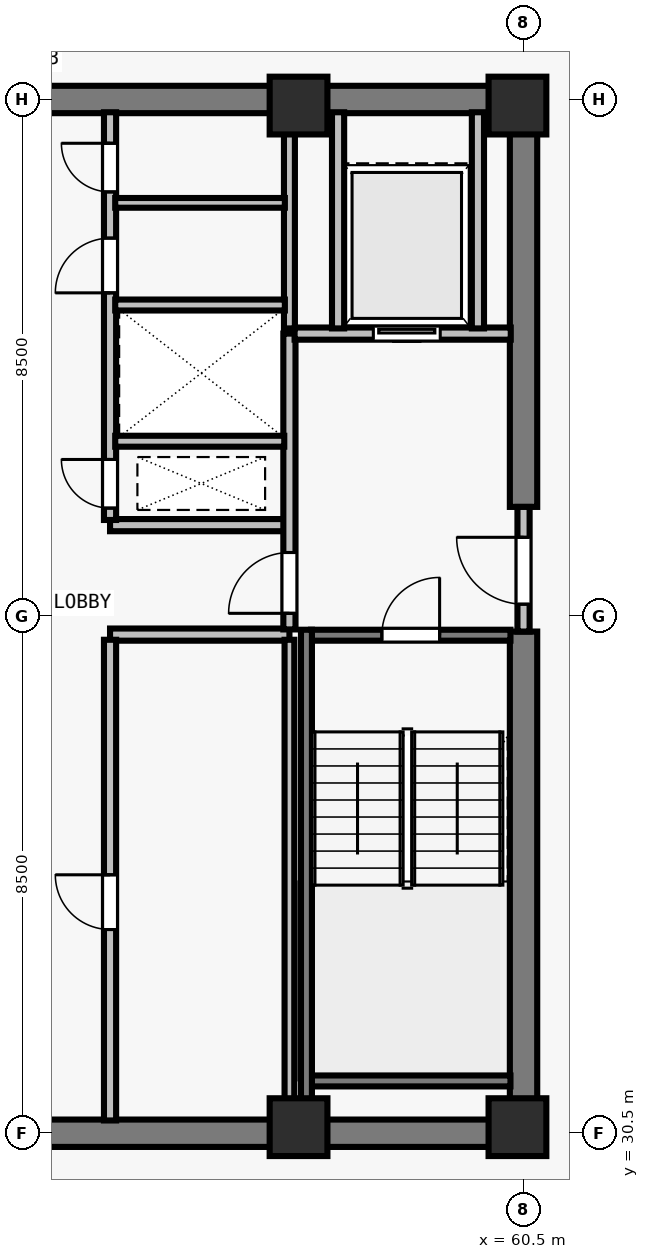
"""IFC4 building model, lengths in metres.
Left out: names, types, materials, properties, quantities, classifications, styles, units other than length and angle.
Written with IfcOpenShell. Run it as: python <this file> out.ifc"""

import sys

from ifc_helpers import new_model, si_unit, direction, frame, frame_2d, origin, origin_2d, place, context, subcontext, project, spatial, rectangle, extrude, element, fill, save


model = new_model("IFC4")
c1 = context("Model", 3, precision=1e-05, world=origin(), true_north=direction((0.0, 1.0)))
c2 = subcontext(c1, "Body", "Model", "MODEL_VIEW")
j1 = project(units=[si_unit("LENGTHUNIT", "METRE"), si_unit("PLANEANGLEUNIT", "RADIAN")], contexts=[c1])
p1 = place(None, origin())
s1 = spatial("IfcSite", under=j1, at=p1, CompositionType="ELEMENT")
p2 = place(p1, origin())
s2 = spatial("IfcBuilding", under=s1, at=p2, CompositionType="ELEMENT")
p3 = place(p2, frame((0.0, 0.0, 265.5)))
s3 = spatial("IfcBuildingStorey", under=s2, at=p3, CompositionType="ELEMENT", Elevation=265.5)
for number, where, z_axis, x_axis in (
    (1, (56.8, 30.6, 0.0), (0.0, 0.0, 1.0), (1.0, 0.0, 0.0)),
    (2, (60.4, 30.6, 0.0), (0.0, 0.0, 1.0), (1.0, 0.0, 0.0)),
    (3, (56.8, 47.4, 0.0), (0.0, 0.0, 1.0), (1.0, 0.0, 0.0)),
    (4, (60.4, 47.4, 0.0), (0.0, 0.0, 1.0), (1.0, 0.0, 0.0)),
):
    element("IfcColumn", number, at=place(p3, frame(where, z_axis=z_axis, x_axis=x_axis)), inside=s3, PredefinedType="COLUMN", context=c2, shape_type="SweptSolid", body=[
        extrude(rectangle(XDim=0.95, YDim=0.95, at=origin_2d()), origin(), (0.0, 0.0, 1.0), 3.5),
    ])
for number, where, z_axis, x_axis in (
    (5, (43.275, 30.5, 0.0), (0.0, 0.0, 1.0), (1.0, 0.0, 0.0)),
    (6, (43.275, 47.5, 0.0), (0.0, 0.0, 1.0), (1.0, 0.0, 0.0)),
):
    element("IfcWall", number, at=place(p3, frame(where, z_axis=z_axis, x_axis=x_axis)), inside=s3, PredefinedType="SHEAR", context=c2, shape_type="SweptSolid", body=[
        extrude(rectangle(XDim=17.45, YDim=0.45, at=frame_2d((8.725, 0.0))), origin(), (0.0, 0.0, 1.0), 3.29),
    ])
p4 = place(p3, frame((60.5, 30.715, 0.0), z_axis=(0.0, 0.0, 1.0), x_axis=(0.0, 1.0, 0.0)))
e7 = element("IfcWall", 7, at=p4, inside=s3, PredefinedType="SHEAR", context=c2, shape_type="SweptSolid", body=[
    extrude(rectangle(XDim=8.035, YDim=0.45, at=frame_2d((4.018, 0.0))), origin(), (0.0, 0.0, 1.0), 3.29),
])
p5 = place(p3, frame((60.5, 40.8, 0.0), z_axis=(0.0, 0.0, 1.0), x_axis=(0.0, 1.0, 0.0)))
e8 = element("IfcWall", 8, at=p5, inside=s3, PredefinedType="SHEAR", context=c2, shape_type="SweptSolid", body=[
    extrude(rectangle(XDim=6.485, YDim=0.45, at=frame_2d((3.242, 0.0))), origin(), (0.0, 0.0, 1.0), 3.29),
])
for number, where, z_axis, x_axis in (
    (9, (53.7, 38.7, 0.0), (0.0, 0.0, 1.0), (1.0, 0.0, 0.0)),
    (10, (53.7, 40.5, 0.0), (0.0, 0.0, 1.0), (1.0, 0.0, 0.0)),
):
    element("IfcWall", number, at=place(p3, frame(where, z_axis=z_axis, x_axis=x_axis)), inside=s3, PredefinedType="SOLIDWALL", context=c2, shape_type="SweptSolid", body=[
        extrude(rectangle(XDim=2.95, YDim=0.2, at=frame_2d((1.475, 0.0))), origin(), (0.0, 0.0, 1.0), 3.29),
    ])
p6 = place(p3, frame((53.7, 30.71, 0.0), z_axis=(0.0, 0.0, 1.0), x_axis=(0.0, 1.0, 0.0)))
e11 = element("IfcWall", 11, at=p6, inside=s3, PredefinedType="SOLIDWALL", context=c2, shape_type="SweptSolid", body=[
    extrude(rectangle(XDim=7.905, YDim=0.2, at=frame_2d((3.953, 0.0))), origin(), (0.0, 0.0, 1.0), 3.29),
])
p7 = place(p6, frame((3.14, 0.0, 0.0)))
e12 = element("IfcOpeningElement", 12, at=p7, cuts=e11, PredefinedType="OPENING", context=c2, shape_type="SweptSolid", body=[
    extrude(rectangle(XDim=0.9, YDim=2.12, at=frame_2d((0.45, 1.06))), frame((0.0, 0.11, 0.0), z_axis=(0.0, -1.0, 0.0), x_axis=(1.0, 0.0, 0.0)), (0.0, 0.0, 1.0), 0.22),
])
p8 = place(p3, frame((53.7, 40.585, 0.0), z_axis=(0.0, 0.0, 1.0), x_axis=(0.0, 1.0, 0.0)))
e13 = element("IfcWall", 13, at=p8, inside=s3, PredefinedType="SOLIDWALL", context=c2, shape_type="SweptSolid", body=[
    extrude(rectangle(XDim=6.705, YDim=0.2, at=frame_2d((3.353, 0.0))), origin(), (0.0, 0.0, 1.0), 3.29),
])
p9 = place(p8, frame((0.195, 0.0, 0.0)))
e14 = element("IfcOpeningElement", 14, at=p9, cuts=e13, PredefinedType="OPENING", context=c2, shape_type="SweptSolid", body=[
    extrude(rectangle(XDim=0.8, YDim=2.08, at=frame_2d((0.4, 1.04))), frame((0.0, 0.11, 0.0), z_axis=(0.0, -1.0, 0.0), x_axis=(1.0, 0.0, 0.0)), (0.0, 0.0, 1.0), 0.22),
])
p10 = place(p8, frame((3.735, 0.0, 0.0)))
e15 = element("IfcOpeningElement", 15, at=p10, cuts=e13, PredefinedType="OPENING", context=c2, shape_type="SweptSolid", body=[
    extrude(rectangle(XDim=0.9, YDim=2.12, at=frame_2d((0.45, 1.06))), frame((0.0, 0.11, 0.0), z_axis=(0.0, -1.0, 0.0), x_axis=(1.0, 0.0, 0.0)), (0.0, 0.0, 1.0), 0.22),
])
p11 = place(p8, frame((5.395, 0.0, 0.0)))
e16 = element("IfcOpeningElement", 16, at=p11, cuts=e13, PredefinedType="OPENING", context=c2, shape_type="SweptSolid", body=[
    extrude(rectangle(XDim=0.8, YDim=2.1, at=frame_2d((0.4, 1.05))), frame((0.0, 0.11, 0.0), z_axis=(0.0, -1.0, 0.0), x_axis=(1.0, 0.0, 0.0)), (0.0, 0.0, 1.0), 0.22),
])
p12 = place(p3, frame((60.5, 38.75, 0.0), z_axis=(0.0, 0.0, 1.0), x_axis=(0.0, 1.0, 0.0)))
e17 = element("IfcWall", 17, at=p12, inside=s3, PredefinedType="SOLIDWALL", context=c2, shape_type="SweptSolid", body=[
    extrude(rectangle(XDim=2.05, YDim=0.2, at=frame_2d((1.025, 0.0))), origin(), (0.0, 0.0, 1.0), 3.29),
])
p13 = place(p12, frame((0.45, 0.0, 0.0)))
e18 = element("IfcOpeningElement", 18, at=p13, cuts=e17, PredefinedType="OPENING", context=c2, shape_type="SweptSolid", body=[
    extrude(rectangle(XDim=1.1, YDim=2.15, at=frame_2d((0.55, 1.075))), frame((0.0, 0.11, 0.0), z_axis=(0.0, -1.0, 0.0), x_axis=(1.0, 0.0, 0.0)), (0.0, 0.0, 1.0), 0.22),
])
p14 = place(p3, frame((56.65, 38.785, 0.0), z_axis=(0.0, 0.0, 1.0), x_axis=(0.0, 1.0, 0.0)))
e19 = element("IfcWall", 19, at=p14, inside=s3, PredefinedType="SOLIDWALL", context=c2, shape_type="SweptSolid", body=[
    extrude(rectangle(XDim=4.865, YDim=0.2, at=frame_2d((2.433, 0.0))), origin(), (0.0, 0.0, 1.0), 3.29),
])
p15 = place(p14, frame((0.265, 0.0, 0.0)))
e20 = element("IfcOpeningElement", 20, at=p15, cuts=e19, PredefinedType="OPENING", context=c2, shape_type="SweptSolid", body=[
    extrude(rectangle(XDim=1.0, YDim=2.15, at=frame_2d((0.5, 1.075))), frame((0.0, 0.11, 0.0), z_axis=(0.0, -1.0, 0.0), x_axis=(1.0, 0.0, 0.0)), (0.0, 0.0, 1.0), 0.22),
])
p16 = place(p3, frame((56.735, 43.65, 0.0), z_axis=(0.0, 0.0, 1.0), x_axis=(1.0, 0.0, 0.0)))
e21 = element("IfcWall", 21, at=p16, inside=s3, PredefinedType="SOLIDWALL", context=c2, shape_type="SweptSolid", body=[
    extrude(rectangle(XDim=3.555, YDim=0.2, at=frame_2d((1.777, 0.0))), origin(), (0.0, 0.0, 1.0), 3.29),
])
p17 = place(p16, frame((1.295, 0.0, 0.0)))
e22 = element("IfcOpeningElement", 22, at=p17, cuts=e21, PredefinedType="OPENING", context=c2, shape_type="SweptSolid", body=[
    extrude(rectangle(XDim=1.1, YDim=2.2, at=frame_2d((0.55, 1.1))), frame((0.0, 0.11, 0.0), z_axis=(0.0, -1.0, 0.0), x_axis=(1.0, 0.0, 0.0)), (0.0, 0.0, 1.0), 0.22),
])
for number, where, z_axis, x_axis in (
    (23, (57.45, 43.735, 0.0), (0.0, 0.0, 1.0), (0.0, 1.0, 0.0)),
    (24, (59.75, 43.735, 0.0), (0.0, 0.0, 1.0), (0.0, 1.0, 0.0)),
):
    element("IfcWall", number, at=place(p3, frame(where, z_axis=z_axis, x_axis=x_axis)), inside=s3, PredefinedType="SOLIDWALL", context=c2, shape_type="SweptSolid", body=[
        extrude(rectangle(XDim=3.555, YDim=0.2, at=frame_2d((1.777, 0.0))), origin(), (0.0, 0.0, 1.0), 3.29),
    ])
p18 = place(p3, frame((56.65, 30.71, 0.0), z_axis=(0.0, 0.0, 1.0), x_axis=(0.0, 1.0, 0.0)))
e25 = element("IfcWall", 25, at=p18, inside=s3, PredefinedType="PARTITIONING", context=c2, shape_type="SweptSolid", body=[
    extrude(rectangle(XDim=7.905, YDim=0.16, at=frame_2d((3.953, 0.0))), origin(), (0.0, 0.0, 1.0), 3.29),
])
p19 = place(p3, frame((56.65, 43.735, 0.0), z_axis=(0.0, 0.0, 1.0), x_axis=(0.0, 1.0, 0.0)))
e26 = element("IfcWall", 26, at=p19, inside=s3, PredefinedType="SOLIDWALL", context=c2, shape_type="SweptSolid", body=[
    extrude(rectangle(XDim=3.555, YDim=0.18, at=frame_2d((1.777, 0.0))), origin(), (0.0, 0.0, 1.0), 3.29),
])
p20 = place(p3, frame((53.785, 41.88, 0.0), z_axis=(0.0, 0.0, 1.0), x_axis=(1.0, 0.0, 0.0)))
e27 = element("IfcWall", 27, at=p20, inside=s3, PredefinedType="SOLIDWALL", context=c2, shape_type="SweptSolid", body=[
    extrude(rectangle(XDim=2.78, YDim=0.18, at=frame_2d((1.39, 0.0))), origin(), (0.0, 0.0, 1.0), 3.29),
])
p21 = place(p3, frame((53.785, 44.12, 0.0), z_axis=(0.0, 0.0, 1.0), x_axis=(1.0, 0.0, 0.0)))
e28 = element("IfcWall", 28, at=p21, inside=s3, PredefinedType="SOLIDWALL", context=c2, shape_type="SweptSolid", body=[
    extrude(rectangle(XDim=2.79, YDim=0.18, at=frame_2d((1.395, 0.0))), origin(), (0.0, 0.0, 1.0), 3.29),
])
p22 = place(p3, frame((53.785, 45.8, 0.0), z_axis=(0.0, 0.0, 1.0), x_axis=(1.0, 0.0, 0.0)))
e29 = element("IfcWall", 29, at=p22, inside=s3, PredefinedType="PARTITIONING", context=c2, shape_type="SweptSolid", body=[
    extrude(rectangle(XDim=2.79, YDim=0.16, at=frame_2d((1.395, 0.0))), origin(), (0.0, 0.0, 1.0), 3.29),
])
p23 = place(p3, frame((57.005, 38.69, 0.0), z_axis=(0.0, 0.0, 1.0), x_axis=(1.0, 0.0, 0.0)))
e30 = element("IfcWall", 30, at=p23, inside=s3, PredefinedType="SOLIDWALL", context=c2, shape_type="SweptSolid", body=[
    extrude(rectangle(XDim=3.28, YDim=0.18, at=frame_2d((1.64, 0.0))), origin(), (0.0, 0.0, 1.0), 3.29),
])
p24 = place(p23, frame((1.165, 0.0, 0.0)))
e31 = element("IfcOpeningElement", 31, at=p24, cuts=e30, PredefinedType="OPENING", context=c2, shape_type="SweptSolid", body=[
    extrude(rectangle(XDim=0.95, YDim=2.15, at=frame_2d((0.475, 1.075))), frame((0.0, 0.1, 0.0), z_axis=(0.0, -1.0, 0.0), x_axis=(1.0, 0.0, 0.0)), (0.0, 0.0, 1.0), 0.2),
])
p25 = place(p3, frame((57.005, 31.36, 0.0), z_axis=(0.0, 0.0, 1.0), x_axis=(1.0, 0.0, 0.0)))
e32 = element("IfcWall", 32, at=p25, inside=s3, PredefinedType="SOLIDWALL", context=c2, shape_type="SweptSolid", body=[
    extrude(rectangle(XDim=3.28, YDim=0.18, at=frame_2d((1.64, 0.0))), origin(), (0.0, 0.0, 1.0), 3.29),
])
p26 = place(p3, frame((56.93, 38.78, 0.0), z_axis=(0.0, 0.0, 1.0), x_axis=(0.0, -1.0, 0.0)))
e33 = element("IfcWall", 33, at=p26, inside=s3, PredefinedType="SOLIDWALL", context=c2, shape_type="SweptSolid", body=[
    extrude(rectangle(XDim=8.067, YDim=0.18, at=frame_2d((4.034, 0.0))), origin(), (0.0, 0.0, 1.0), 3.29),
])
p27 = place(p13, origin())
e34 = element("IfcDoor", 34, at=p27, inside=s3, OperationType="SINGLE_SWING_RIGHT", PredefinedType="DOOR", context=c2, shape_type="SweptSolid", body=[
    extrude(rectangle(XDim=1.1, YDim=2.15, at=frame_2d((0.55, 1.075))), frame((0.0, 0.025, 0.0), z_axis=(0.0, -1.0, 0.0), x_axis=(1.0, 0.0, 0.0)), (0.0, 0.0, 1.0), 0.05),
])
fill(e18, e34)
p28 = place(p15, origin())
e35 = element("IfcDoor", 35, at=p28, inside=s3, OperationType="SINGLE_SWING_LEFT", PredefinedType="DOOR", context=c2, shape_type="SweptSolid", body=[
    extrude(rectangle(XDim=1.0, YDim=2.15, at=frame_2d((0.5, 1.075))), frame((0.0, 0.025, 0.0), z_axis=(0.0, -1.0, 0.0), x_axis=(1.0, 0.0, 0.0)), (0.0, 0.0, 1.0), 0.05),
])
fill(e20, e35)
p29 = place(p17, origin())
e36 = element("IfcDoor", 36, at=p29, inside=s3, OperationType="SLIDING_TO_LEFT", PredefinedType="DOOR", context=c2, shape_type="SweptSolid", body=[
    extrude(rectangle(XDim=1.1, YDim=2.2, at=frame_2d((0.55, 1.1))), frame((0.0, 0.025, 0.0), z_axis=(0.0, -1.0, 0.0), x_axis=(1.0, 0.0, 0.0)), (0.0, 0.0, 1.0), 0.05),
])
fill(e22, e36)
p30 = place(p7, origin())
e37 = element("IfcDoor", 37, at=p30, inside=s3, OperationType="SINGLE_SWING_RIGHT", PredefinedType="DOOR", context=c2, shape_type="SweptSolid", body=[
    extrude(rectangle(XDim=0.9, YDim=2.12, at=frame_2d((0.45, 1.06))), frame((0.0, 0.025, 0.0), z_axis=(0.0, -1.0, 0.0), x_axis=(1.0, 0.0, 0.0)), (0.0, 0.0, 1.0), 0.05),
])
fill(e12, e37)
p31 = place(p9, origin())
e38 = element("IfcDoor", 38, at=p31, inside=s3, OperationType="SINGLE_SWING_RIGHT", PredefinedType="DOOR", context=c2, shape_type="SweptSolid", body=[
    extrude(rectangle(XDim=0.8, YDim=2.08, at=frame_2d((0.4, 1.04))), frame((0.0, 0.025, 0.0), z_axis=(0.0, -1.0, 0.0), x_axis=(1.0, 0.0, 0.0)), (0.0, 0.0, 1.0), 0.05),
])
fill(e14, e38)
p32 = place(p10, origin())
e39 = element("IfcDoor", 39, at=p32, inside=s3, OperationType="SINGLE_SWING_LEFT", PredefinedType="DOOR", context=c2, shape_type="SweptSolid", body=[
    extrude(rectangle(XDim=0.9, YDim=2.12, at=frame_2d((0.45, 1.06))), frame((0.0, 0.025, 0.0), z_axis=(0.0, -1.0, 0.0), x_axis=(1.0, 0.0, 0.0)), (0.0, 0.0, 1.0), 0.05),
])
fill(e15, e39)
p33 = place(p11, origin())
e40 = element("IfcDoor", 40, at=p33, inside=s3, OperationType="SINGLE_SWING_RIGHT", PredefinedType="DOOR", context=c2, shape_type="SweptSolid", body=[
    extrude(rectangle(XDim=0.8, YDim=2.1, at=frame_2d((0.4, 1.05))), frame((0.0, 0.025, 0.0), z_axis=(0.0, -1.0, 0.0), x_axis=(1.0, 0.0, 0.0)), (0.0, 0.0, 1.0), 0.05),
])
fill(e16, e40)
p34 = place(p24, origin())
e41 = element("IfcDoor", 41, at=p34, inside=s3, OperationType="SINGLE_SWING_RIGHT", PredefinedType="DOOR", context=c2, shape_type="SweptSolid", body=[
    extrude(rectangle(XDim=0.95, YDim=2.15, at=frame_2d((0.475, 1.075))), frame((0.0, 0.025, 0.0), z_axis=(0.0, -1.0, 0.0), x_axis=(1.0, 0.0, 0.0)), (0.0, 0.0, 1.0), 0.05),
])
fill(e31, e41)
save(model, sys.argv[1])
